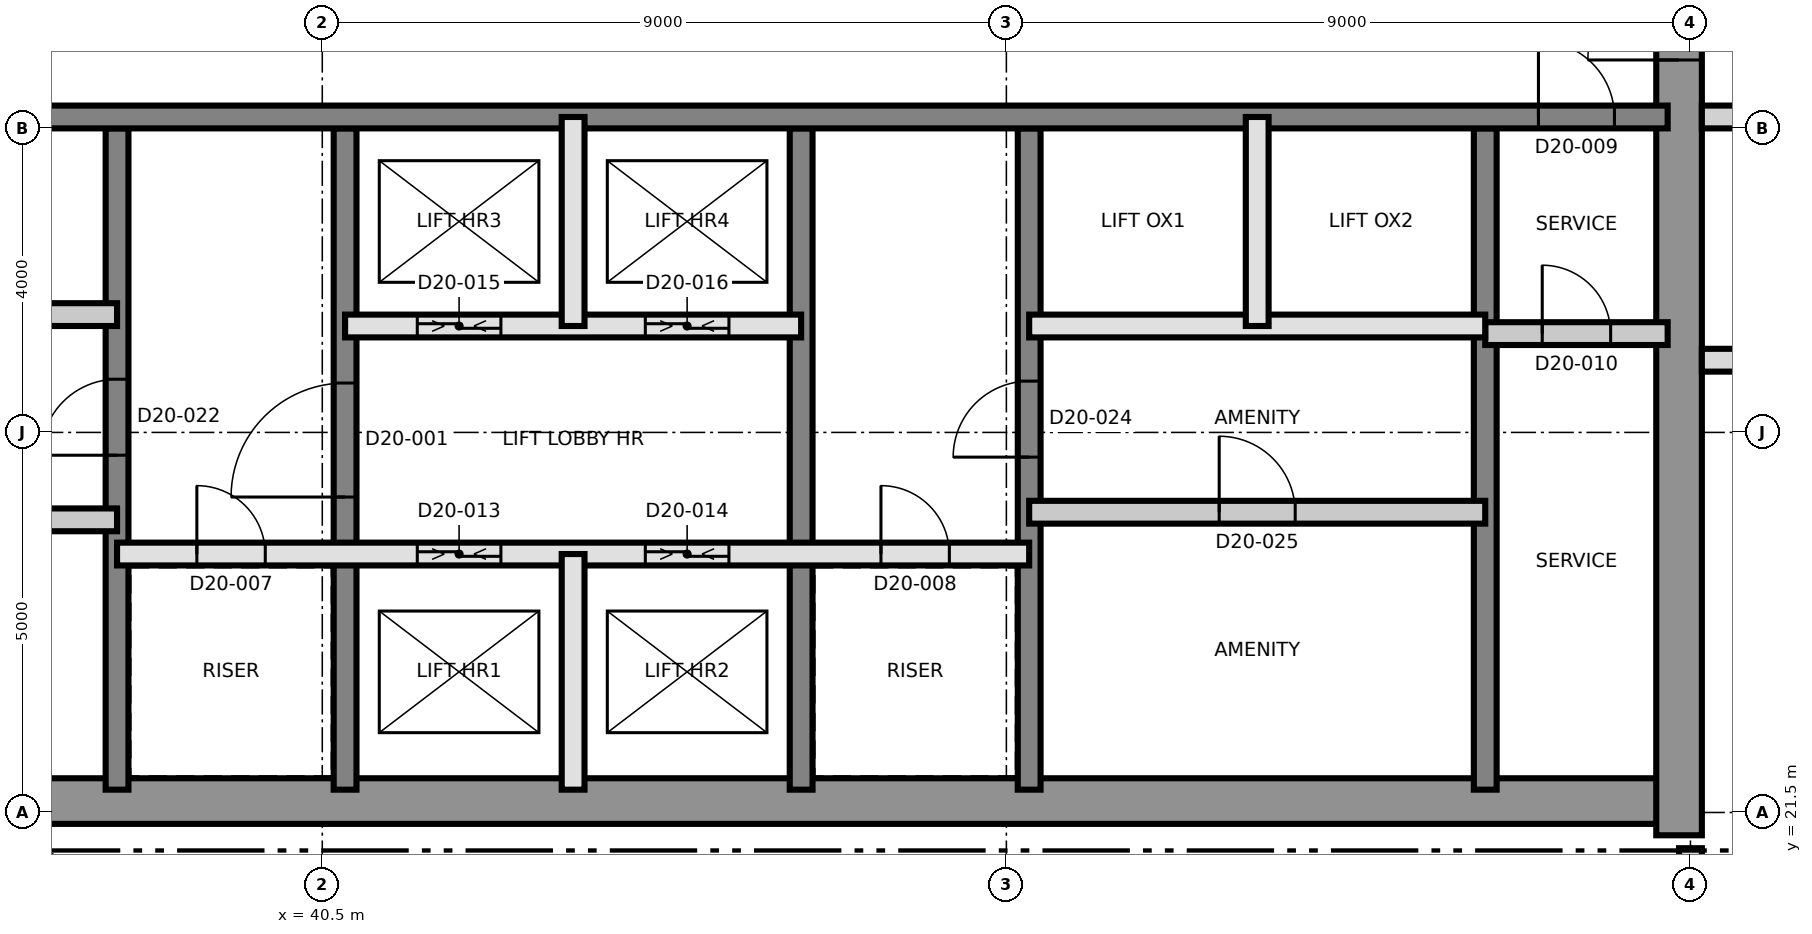
"""IFC4 building model, lengths in metres.
Left out: names, types, materials, properties, quantities, classifications, styles, units other than length and angle.
Written with IfcOpenShell. Run it as: python <this file> out.ifc"""

import sys

from ifc_helpers import new_model, si_unit, direction, frame, frame_2d, origin, place, context, subcontext, project, spatial, rectangle, extrude, element, fill, save


model = new_model("IFC4")
c1 = context("Model", 3, precision=1e-05, world=origin(), true_north=direction((0.0, 1.0)))
c2 = subcontext(c1, "Body", "Model", "MODEL_VIEW")
j1 = project(units=[si_unit("LENGTHUNIT", "METRE"), si_unit("PLANEANGLEUNIT", "RADIAN")], contexts=[c1])
p1 = place(None, origin())
s1 = spatial("IfcSite", under=j1, at=p1, CompositionType="ELEMENT")
p2 = place(p1, origin())
s2 = spatial("IfcBuilding", under=s1, at=p2, CompositionType="ELEMENT")
p3 = place(p2, frame((0.0, 0.0, 186.6)))
s3 = spatial("IfcBuildingStorey", under=s2, at=p3, CompositionType="ELEMENT", Elevation=186.6)
p4 = place(p3, frame((31.2, 21.65, 0.0), z_axis=(0.0, 0.0, 1.0), x_axis=(1.0, 0.0, 0.0)))
e1 = element("IfcWall", 1, at=p4, inside=s3, PredefinedType="SHEAR", context=c2, shape_type="SweptSolid", body=[
    extrude(rectangle(XDim=27.0, YDim=0.6, at=frame_2d((13.5, 0.0))), origin(), (0.0, 0.0, 1.0), 3.7),
])
p5 = place(p3, frame((58.35, 21.2, 0.0), z_axis=(0.0, 0.0, 1.0), x_axis=(0.0, 1.0, 0.0)))
e2 = element("IfcWall", 2, at=p5, inside=s3, PredefinedType="SHEAR", context=c2, shape_type="SweptSolid", body=[
    extrude(rectangle(XDim=18.6, YDim=0.6, at=frame_2d((9.3, 0.0))), origin(), (0.0, 0.0, 1.0), 3.7),
])
p6 = place(p5, frame((10.2, 0.0, 0.0)))
e3 = element("IfcOpeningElement", 3, at=p6, cuts=e2, PredefinedType="OPENING", context=c2, shape_type="SweptSolid", body=[
    extrude(rectangle(XDim=1.2, YDim=2.1, at=frame_2d((0.6, 1.05))), frame((0.0, 0.31, 0.0), z_axis=(0.0, -1.0, 0.0), x_axis=(1.0, 0.0, 0.0)), (0.0, 0.0, 1.0), 0.62),
])
p7 = place(p3, frame((37.8, 21.8, 0.0), z_axis=(0.0, 0.0, 1.0), x_axis=(0.0, 1.0, 0.0)))
e4 = element("IfcWall", 4, at=p7, inside=s3, PredefinedType="SHEAR", context=c2, shape_type="SweptSolid", body=[
    extrude(rectangle(XDim=8.7, YDim=0.3, at=frame_2d((4.35, 0.0))), origin(), (0.0, 0.0, 1.0), 3.7),
])
p8 = place(p7, frame((4.4, 0.0, 0.0)))
e5 = element("IfcOpeningElement", 5, at=p8, cuts=e4, PredefinedType="OPENING", context=c2, shape_type="SweptSolid", body=[
    extrude(rectangle(XDim=1.0, YDim=2.1, at=frame_2d((0.5, 1.05))), frame((0.0, 0.16, 0.0), z_axis=(0.0, -1.0, 0.0), x_axis=(1.0, 0.0, 0.0)), (0.0, 0.0, 1.0), 0.32),
])
p9 = place(p3, frame((40.8, 21.8, 0.0), z_axis=(0.0, 0.0, 1.0), x_axis=(0.0, 1.0, 0.0)))
e6 = element("IfcWall", 6, at=p9, inside=s3, PredefinedType="SHEAR", context=c2, shape_type="SweptSolid", body=[
    extrude(rectangle(XDim=8.7, YDim=0.3, at=frame_2d((4.35, 0.0))), origin(), (0.0, 0.0, 1.0), 3.7),
])
p10 = place(p9, frame((3.85, 0.0, 0.0)))
e7 = element("IfcOpeningElement", 7, at=p10, cuts=e6, PredefinedType="OPENING", context=c2, shape_type="SweptSolid", body=[
    extrude(rectangle(XDim=1.5, YDim=2.1, at=frame_2d((0.75, 1.05))), frame((0.0, 0.16, 0.0), z_axis=(0.0, -1.0, 0.0), x_axis=(1.0, 0.0, 0.0)), (0.0, 0.0, 1.0), 0.32),
])
p11 = place(p3, frame((46.8, 21.8, 0.0), z_axis=(0.0, 0.0, 1.0), x_axis=(0.0, 1.0, 0.0)))
e8 = element("IfcWall", 8, at=p11, inside=s3, PredefinedType="SHEAR", context=c2, shape_type="SweptSolid", body=[
    extrude(rectangle(XDim=8.7, YDim=0.3, at=frame_2d((4.35, 0.0))), origin(), (0.0, 0.0, 1.0), 3.7),
])
p12 = place(p3, frame((49.8, 21.8, 0.0), z_axis=(0.0, 0.0, 1.0), x_axis=(0.0, 1.0, 0.0)))
e9 = element("IfcWall", 9, at=p12, inside=s3, PredefinedType="SHEAR", context=c2, shape_type="SweptSolid", body=[
    extrude(rectangle(XDim=8.7, YDim=0.3, at=frame_2d((4.35, 0.0))), origin(), (0.0, 0.0, 1.0), 3.7),
])
p13 = place(p12, frame((4.375, 0.0, 0.0)))
e10 = element("IfcOpeningElement", 10, at=p13, cuts=e9, PredefinedType="OPENING", context=c2, shape_type="SweptSolid", body=[
    extrude(rectangle(XDim=1.0, YDim=2.1, at=frame_2d((0.5, 1.05))), frame((0.0, 0.16, 0.0), z_axis=(0.0, -1.0, 0.0), x_axis=(1.0, 0.0, 0.0)), (0.0, 0.0, 1.0), 0.32),
])
p14 = place(p3, frame((55.8, 21.8, 0.0), z_axis=(0.0, 0.0, 1.0), x_axis=(0.0, 1.0, 0.0)))
e11 = element("IfcWall", 11, at=p14, inside=s3, PredefinedType="SHEAR", context=c2, shape_type="SweptSolid", body=[
    extrude(rectangle(XDim=8.7, YDim=0.3, at=frame_2d((4.35, 0.0))), origin(), (0.0, 0.0, 1.0), 3.7),
])
p15 = place(p3, frame((31.8, 30.65, 0.0), z_axis=(0.0, 0.0, 1.0), x_axis=(1.0, 0.0, 0.0)))
e12 = element("IfcWall", 12, at=p15, inside=s3, PredefinedType="SHEAR", context=c2, shape_type="SweptSolid", body=[
    extrude(rectangle(XDim=26.4, YDim=0.3, at=frame_2d((13.2, 0.0))), origin(), (0.0, 0.0, 1.0), 3.7),
])
p16 = place(p15, frame((24.7, 0.0, 0.0)))
e13 = element("IfcOpeningElement", 13, at=p16, cuts=e12, PredefinedType="OPENING", context=c2, shape_type="SweptSolid", body=[
    extrude(rectangle(XDim=1.0, YDim=2.1, at=frame_2d((0.5, 1.05))), frame((0.0, 0.16, 0.0), z_axis=(0.0, -1.0, 0.0), x_axis=(1.0, 0.0, 0.0)), (0.0, 0.0, 1.0), 0.32),
])
p17 = place(p15, frame((4.0, 0.0, 0.0)))
e14 = element("IfcOpeningElement", 14, at=p17, cuts=e12, PredefinedType="OPENING", context=c2, shape_type="SweptSolid", body=[
    extrude(rectangle(XDim=1.0, YDim=2.1, at=frame_2d((0.5, 1.05))), frame((0.0, 0.16, 0.0), z_axis=(0.0, -1.0, 0.0), x_axis=(1.0, 0.0, 0.0)), (0.0, 0.0, 1.0), 0.32),
])
p18 = place(p3, frame((36.788, 20.834, 0.0), z_axis=(0.0, 0.0, 1.0), x_axis=(0.896857753975, -0.442319080682, 0.0)))
e15 = element("IfcWall", 15, at=p18, inside=s3, PredefinedType="SOLIDWALL", context=c2, shape_type="SweptSolid", body=[
    extrude(rectangle(XDim=1.618, YDim=0.3, at=frame_2d((0.809, 0.0))), origin(), (0.0, 0.0, 1.0), 3.4),
])
p19 = place(p3, frame((37.8, 24.9, 0.0), z_axis=(0.0, 0.0, 1.0), x_axis=(1.0, 0.0, 0.0)))
e16 = element("IfcWall", 16, at=p19, inside=s3, PredefinedType="SOLIDWALL", context=c2, shape_type="SweptSolid", body=[
    extrude(rectangle(XDim=12.0, YDim=0.3, at=frame_2d((6.0, 0.0))), origin(), (0.0, 0.0, 1.0), 3.4),
])
p20 = place(p19, frame((1.05, 0.0, 0.0)))
e17 = element("IfcOpeningElement", 17, at=p20, cuts=e16, PredefinedType="OPENING", context=c2, shape_type="SweptSolid", body=[
    extrude(rectangle(XDim=0.9, YDim=2.1, at=frame_2d((0.45, 1.05))), frame((0.0, 0.16, 0.0), z_axis=(0.0, -1.0, 0.0), x_axis=(1.0, 0.0, 0.0)), (0.0, 0.0, 1.0), 0.32),
])
p21 = place(p19, frame((10.05, 0.0, 0.0)))
e18 = element("IfcOpeningElement", 18, at=p21, cuts=e16, PredefinedType="OPENING", context=c2, shape_type="SweptSolid", body=[
    extrude(rectangle(XDim=0.9, YDim=2.1, at=frame_2d((0.45, 1.05))), frame((0.0, 0.16, 0.0), z_axis=(0.0, -1.0, 0.0), x_axis=(1.0, 0.0, 0.0)), (0.0, 0.0, 1.0), 0.32),
])
p22 = place(p19, frame((3.95, 0.0, 0.0)))
e19 = element("IfcOpeningElement", 19, at=p22, cuts=e16, PredefinedType="OPENING", context=c2, shape_type="SweptSolid", body=[
    extrude(rectangle(XDim=1.1, YDim=2.4, at=frame_2d((0.55, 1.2))), frame((0.0, 0.16, 0.0), z_axis=(0.0, -1.0, 0.0), x_axis=(1.0, 0.0, 0.0)), (0.0, 0.0, 1.0), 0.32),
])
p23 = place(p19, frame((6.95, 0.0, 0.0)))
e20 = element("IfcOpeningElement", 20, at=p23, cuts=e16, PredefinedType="OPENING", context=c2, shape_type="SweptSolid", body=[
    extrude(rectangle(XDim=1.1, YDim=2.4, at=frame_2d((0.55, 1.2))), frame((0.0, 0.16, 0.0), z_axis=(0.0, -1.0, 0.0), x_axis=(1.0, 0.0, 0.0)), (0.0, 0.0, 1.0), 0.32),
])
p24 = place(p3, frame((31.8, 25.35, 0.0), z_axis=(0.0, 0.0, 1.0), x_axis=(1.0, 0.0, 0.0)))
e21 = element("IfcWall", 21, at=p24, inside=s3, PredefinedType="PARTITIONING", context=c2, shape_type="SweptSolid", body=[
    extrude(rectangle(XDim=6.0, YDim=0.3, at=frame_2d((3.0, 0.0))), origin(), (0.0, 0.0, 1.0), 3.4),
])
p25 = place(p24, frame((2.5, 0.0, 0.0)))
e22 = element("IfcOpeningElement", 22, at=p25, cuts=e21, PredefinedType="OPENING", context=c2, shape_type="SweptSolid", body=[
    extrude(rectangle(XDim=1.0, YDim=2.1, at=frame_2d((0.5, 1.05))), frame((0.0, 0.16, 0.0), z_axis=(0.0, -1.0, 0.0), x_axis=(1.0, 0.0, 0.0)), (0.0, 0.0, 1.0), 0.32),
])
p26 = place(p3, frame((49.8, 25.45, 0.0), z_axis=(0.0, 0.0, 1.0), x_axis=(1.0, 0.0, 0.0)))
e23 = element("IfcWall", 23, at=p26, inside=s3, PredefinedType="PARTITIONING", context=c2, shape_type="SweptSolid", body=[
    extrude(rectangle(XDim=6.0, YDim=0.3, at=frame_2d((3.0, 0.0))), origin(), (0.0, 0.0, 1.0), 3.4),
])
p27 = place(p26, frame((2.5, 0.0, 0.0)))
e24 = element("IfcOpeningElement", 24, at=p27, cuts=e23, PredefinedType="OPENING", context=c2, shape_type="SweptSolid", body=[
    extrude(rectangle(XDim=1.0, YDim=2.1, at=frame_2d((0.5, 1.05))), frame((0.0, 0.16, 0.0), z_axis=(0.0, -1.0, 0.0), x_axis=(1.0, 0.0, 0.0)), (0.0, 0.0, 1.0), 0.32),
])
p28 = place(p3, frame((55.8, 27.8, 0.0), z_axis=(0.0, 0.0, 1.0), x_axis=(1.0, 0.0, 0.0)))
e25 = element("IfcWall", 25, at=p28, inside=s3, PredefinedType="PARTITIONING", context=c2, shape_type="SweptSolid", body=[
    extrude(rectangle(XDim=2.4, YDim=0.3, at=frame_2d((1.2, 0.0))), origin(), (0.0, 0.0, 1.0), 3.4),
])
p29 = place(p28, frame((0.75, 0.0, 0.0)))
e26 = element("IfcOpeningElement", 26, at=p29, cuts=e25, PredefinedType="OPENING", context=c2, shape_type="SweptSolid", body=[
    extrude(rectangle(XDim=0.9, YDim=2.1, at=frame_2d((0.45, 1.05))), frame((0.0, 0.16, 0.0), z_axis=(0.0, -1.0, 0.0), x_axis=(1.0, 0.0, 0.0)), (0.0, 0.0, 1.0), 0.32),
])
p30 = place(p3, frame((40.8, 27.9, 0.0), z_axis=(0.0, 0.0, 1.0), x_axis=(1.0, 0.0, 0.0)))
e27 = element("IfcWall", 27, at=p30, inside=s3, PredefinedType="SOLIDWALL", context=c2, shape_type="SweptSolid", body=[
    extrude(rectangle(XDim=6.0, YDim=0.3, at=frame_2d((3.0, 0.0))), origin(), (0.0, 0.0, 1.0), 3.4),
])
p31 = place(p30, frame((0.95, 0.0, 0.0)))
e28 = element("IfcOpeningElement", 28, at=p31, cuts=e27, PredefinedType="OPENING", context=c2, shape_type="SweptSolid", body=[
    extrude(rectangle(XDim=1.1, YDim=2.4, at=frame_2d((0.55, 1.2))), frame((0.0, 0.16, 0.0), z_axis=(0.0, -1.0, 0.0), x_axis=(1.0, 0.0, 0.0)), (0.0, 0.0, 1.0), 0.32),
])
p32 = place(p30, frame((3.95, 0.0, 0.0)))
e29 = element("IfcOpeningElement", 29, at=p32, cuts=e27, PredefinedType="OPENING", context=c2, shape_type="SweptSolid", body=[
    extrude(rectangle(XDim=1.1, YDim=2.4, at=frame_2d((0.55, 1.2))), frame((0.0, 0.16, 0.0), z_axis=(0.0, -1.0, 0.0), x_axis=(1.0, 0.0, 0.0)), (0.0, 0.0, 1.0), 0.32),
])
p33 = place(p3, frame((49.8, 27.9, 0.0), z_axis=(0.0, 0.0, 1.0), x_axis=(1.0, 0.0, 0.0)))
e30 = element("IfcWall", 30, at=p33, inside=s3, PredefinedType="SOLIDWALL", context=c2, shape_type="SweptSolid", body=[
    extrude(rectangle(XDim=6.0, YDim=0.3, at=frame_2d((3.0, 0.0))), origin(), (0.0, 0.0, 1.0), 3.4),
])
p34 = place(p3, frame((31.8, 28.05, 0.0), z_axis=(0.0, 0.0, 1.0), x_axis=(1.0, 0.0, 0.0)))
e31 = element("IfcWall", 31, at=p34, inside=s3, PredefinedType="PARTITIONING", context=c2, shape_type="SweptSolid", body=[
    extrude(rectangle(XDim=6.0, YDim=0.3, at=frame_2d((3.0, 0.0))), origin(), (0.0, 0.0, 1.0), 3.4),
])
p35 = place(p3, frame((43.8, 21.8, 0.0), z_axis=(0.0, 0.0, 1.0), x_axis=(0.0, 1.0, 0.0)))
e32 = element("IfcWall", 32, at=p35, inside=s3, PredefinedType="SOLIDWALL", context=c2, shape_type="SweptSolid", body=[
    extrude(rectangle(XDim=3.1, YDim=0.3, at=frame_2d((1.55, 0.0))), origin(), (0.0, 0.0, 1.0), 3.4),
])
for number, where, z_axis, x_axis in (
    (33, (43.8, 27.9, 0.0), (0.0, 0.0, 1.0), (0.0, 1.0, 0.0)),
    (34, (52.8, 27.9, 0.0), (0.0, 0.0, 1.0), (0.0, 1.0, 0.0)),
):
    element("IfcWall", number, at=place(p3, frame(where, z_axis=z_axis, x_axis=x_axis)), inside=s3, PredefinedType="SOLIDWALL", context=c2, shape_type="SweptSolid", body=[
        extrude(rectangle(XDim=2.75, YDim=0.3, at=frame_2d((1.375, 0.0))), origin(), (0.0, 0.0, 1.0), 3.4),
    ])
p36 = place(p3, frame((58.65, 27.45, 0.0), z_axis=(0.0, 0.0, 1.0), x_axis=(1.0, 0.0, 0.0)))
e35 = element("IfcWall", 35, at=p36, inside=s3, PredefinedType="PARTITIONING", context=c2, shape_type="SweptSolid", body=[
    extrude(rectangle(XDim=2.55, YDim=0.3, at=frame_2d((1.275, 0.0))), origin(), (0.0, 0.0, 1.0), 3.4),
])
p37 = place(p36, frame((0.8, 0.0, 0.0)))
e36 = element("IfcOpeningElement", 36, at=p37, cuts=e35, PredefinedType="OPENING", context=c2, shape_type="SweptSolid", body=[
    extrude(rectangle(XDim=0.8, YDim=2.1, at=frame_2d((0.4, 1.05))), frame((0.0, 0.16, 0.0), z_axis=(0.0, -1.0, 0.0), x_axis=(1.0, 0.0, 0.0)), (0.0, 0.0, 1.0), 0.32),
])
p38 = place(p3, frame((58.65, 30.65, 0.0), z_axis=(0.0, 0.0, 1.0), x_axis=(1.0, 0.0, 0.0)))
e37 = element("IfcWall", 37, at=p38, inside=s3, PredefinedType="PARTITIONING", context=c2, shape_type="SweptSolid", body=[
    extrude(rectangle(XDim=26.68, YDim=0.3, at=frame_2d((13.34, 0.0))), origin(), (0.0, 0.0, 1.0), 3.4),
])
p39 = place(p38, frame((2.9, 0.0, 0.0)))
e38 = element("IfcOpeningElement", 38, at=p39, cuts=e37, PredefinedType="OPENING", context=c2, shape_type="SweptSolid", body=[
    extrude(rectangle(XDim=1.0, YDim=2.1, at=frame_2d((0.5, 1.05))), frame((0.0, 0.16, 0.0), z_axis=(0.0, -1.0, 0.0), x_axis=(1.0, 0.0, 0.0)), (0.0, 0.0, 1.0), 0.32),
])
p40 = place(p38, frame((5.85, 0.0, 0.0)))
e39 = element("IfcOpeningElement", 39, at=p40, cuts=e37, PredefinedType="OPENING", context=c2, shape_type="SweptSolid", body=[
    extrude(rectangle(XDim=1.4, YDim=2.1, at=frame_2d((0.7, 1.05))), frame((0.0, 0.16, 0.0), z_axis=(0.0, -1.0, 0.0), x_axis=(1.0, 0.0, 0.0)), (0.0, 0.0, 1.0), 0.32),
])
p41 = place(p38, frame((10.0, 0.0, 0.0)))
e40 = element("IfcOpeningElement", 40, at=p41, cuts=e37, PredefinedType="OPENING", context=c2, shape_type="SweptSolid", body=[
    extrude(rectangle(XDim=1.0, YDim=2.1, at=frame_2d((0.5, 1.05))), frame((0.0, 0.16, 0.0), z_axis=(0.0, -1.0, 0.0), x_axis=(1.0, 0.0, 0.0)), (0.0, 0.0, 1.0), 0.32),
])
p42 = place(p38, frame((15.85, 0.0, 0.0)))
e41 = element("IfcOpeningElement", 41, at=p42, cuts=e37, PredefinedType="OPENING", context=c2, shape_type="SweptSolid", body=[
    extrude(rectangle(XDim=1.0, YDim=2.1, at=frame_2d((0.5, 1.05))), frame((0.0, 0.16, 0.0), z_axis=(0.0, -1.0, 0.0), x_axis=(1.0, 0.0, 0.0)), (0.0, 0.0, 1.0), 0.32),
])
p43 = place(p38, frame((20.2, 0.0, 0.0)))
e42 = element("IfcOpeningElement", 42, at=p43, cuts=e37, PredefinedType="OPENING", context=c2, shape_type="SweptSolid", body=[
    extrude(rectangle(XDim=1.0, YDim=2.1, at=frame_2d((0.5, 1.05))), frame((0.0, 0.16, 0.0), z_axis=(0.0, -1.0, 0.0), x_axis=(1.0, 0.0, 0.0)), (0.0, 0.0, 1.0), 0.32),
])
p44 = place(p3, frame((58.5, 19.17, 0.0), z_axis=(0.0, 0.0, 1.0), x_axis=(0.0, 1.0, 0.0)))
e43 = element("IfcWall", 43, at=p44, inside=s3, PredefinedType="PARTITIONING", context=c2, shape_type="SweptSolid", body=[
    extrude(rectangle(XDim=1.86, YDim=0.3, at=frame_2d((0.93, 0.0))), origin(), (0.0, 0.0, 1.0), 3.35),
])
p45 = place(p10, origin())
e44 = element("IfcDoor", 44, at=p45, inside=s3, OperationType="SINGLE_SWING_RIGHT", PredefinedType="DOOR", context=c2, shape_type="SweptSolid", body=[
    extrude(rectangle(XDim=1.5, YDim=2.1, at=frame_2d((0.75, 1.05))), frame((0.0, 0.025, 0.0), z_axis=(0.0, -1.0, 0.0), x_axis=(1.0, 0.0, 0.0)), (0.0, 0.0, 1.0), 0.05),
])
fill(e7, e44)
p46 = place(p20, origin())
e45 = element("IfcDoor", 45, at=p46, inside=s3, OperationType="SINGLE_SWING_LEFT", PredefinedType="DOOR", context=c2, shape_type="SweptSolid", body=[
    extrude(rectangle(XDim=0.9, YDim=2.1, at=frame_2d((0.45, 1.05))), frame((0.0, 0.025, 0.0), z_axis=(0.0, -1.0, 0.0), x_axis=(1.0, 0.0, 0.0)), (0.0, 0.0, 1.0), 0.05),
])
fill(e17, e45)
p47 = place(p21, origin())
e46 = element("IfcDoor", 46, at=p47, inside=s3, OperationType="SINGLE_SWING_RIGHT", PredefinedType="DOOR", context=c2, shape_type="SweptSolid", body=[
    extrude(rectangle(XDim=0.9, YDim=2.1, at=frame_2d((0.45, 1.05))), frame((0.0, 0.025, 0.0), z_axis=(0.0, -1.0, 0.0), x_axis=(1.0, 0.0, 0.0)), (0.0, 0.0, 1.0), 0.05),
])
fill(e18, e46)
p48 = place(p16, origin())
e47 = element("IfcDoor", 47, at=p48, inside=s3, OperationType="SINGLE_SWING_LEFT", PredefinedType="DOOR", context=c2, shape_type="SweptSolid", body=[
    extrude(rectangle(XDim=1.0, YDim=2.1, at=frame_2d((0.5, 1.05))), frame((0.0, 0.025, 0.0), z_axis=(0.0, -1.0, 0.0), x_axis=(1.0, 0.0, 0.0)), (0.0, 0.0, 1.0), 0.05),
])
fill(e13, e47)
p49 = place(p29, origin())
e48 = element("IfcDoor", 48, at=p49, inside=s3, OperationType="SINGLE_SWING_RIGHT", PredefinedType="DOOR", context=c2, shape_type="SweptSolid", body=[
    extrude(rectangle(XDim=0.9, YDim=2.1, at=frame_2d((0.45, 1.05))), frame((0.0, 0.025, 0.0), z_axis=(0.0, -1.0, 0.0), x_axis=(1.0, 0.0, 0.0)), (0.0, 0.0, 1.0), 0.05),
])
fill(e26, e48)
p50 = place(p6, origin())
e49 = element("IfcDoor", 49, at=p50, inside=s3, OperationType="SINGLE_SWING_LEFT", PredefinedType="DOOR", context=c2, shape_type="SweptSolid", body=[
    extrude(rectangle(XDim=1.2, YDim=2.1, at=frame_2d((0.6, 1.05))), frame((0.0, 0.025, 0.0), z_axis=(0.0, -1.0, 0.0), x_axis=(1.0, 0.0, 0.0)), (0.0, 0.0, 1.0), 0.05),
])
fill(e3, e49)
p51 = place(p22, origin())
e50 = element("IfcDoor", 50, at=p51, inside=s3, OperationType="SLIDING_TO_LEFT", PredefinedType="DOOR", context=c2, shape_type="SweptSolid", body=[
    extrude(rectangle(XDim=1.1, YDim=2.4, at=frame_2d((0.55, 1.2))), frame((0.0, 0.025, 0.0), z_axis=(0.0, -1.0, 0.0), x_axis=(1.0, 0.0, 0.0)), (0.0, 0.0, 1.0), 0.05),
])
fill(e19, e50)
p52 = place(p23, origin())
e51 = element("IfcDoor", 51, at=p52, inside=s3, OperationType="SLIDING_TO_LEFT", PredefinedType="DOOR", context=c2, shape_type="SweptSolid", body=[
    extrude(rectangle(XDim=1.1, YDim=2.4, at=frame_2d((0.55, 1.2))), frame((0.0, 0.025, 0.0), z_axis=(0.0, -1.0, 0.0), x_axis=(1.0, 0.0, 0.0)), (0.0, 0.0, 1.0), 0.05),
])
fill(e20, e51)
p53 = place(p31, origin())
e52 = element("IfcDoor", 52, at=p53, inside=s3, OperationType="SLIDING_TO_LEFT", PredefinedType="DOOR", context=c2, shape_type="SweptSolid", body=[
    extrude(rectangle(XDim=1.1, YDim=2.4, at=frame_2d((0.55, 1.2))), frame((0.0, 0.025, 0.0), z_axis=(0.0, -1.0, 0.0), x_axis=(1.0, 0.0, 0.0)), (0.0, 0.0, 1.0), 0.05),
])
fill(e28, e52)
p54 = place(p32, origin())
e53 = element("IfcDoor", 53, at=p54, inside=s3, OperationType="SLIDING_TO_LEFT", PredefinedType="DOOR", context=c2, shape_type="SweptSolid", body=[
    extrude(rectangle(XDim=1.1, YDim=2.4, at=frame_2d((0.55, 1.2))), frame((0.0, 0.025, 0.0), z_axis=(0.0, -1.0, 0.0), x_axis=(1.0, 0.0, 0.0)), (0.0, 0.0, 1.0), 0.05),
])
fill(e29, e53)
p55 = place(p8, origin())
e54 = element("IfcDoor", 54, at=p55, inside=s3, OperationType="SINGLE_SWING_RIGHT", PredefinedType="DOOR", context=c2, shape_type="SweptSolid", body=[
    extrude(rectangle(XDim=1.0, YDim=2.1, at=frame_2d((0.5, 1.05))), frame((0.0, 0.025, 0.0), z_axis=(0.0, -1.0, 0.0), x_axis=(1.0, 0.0, 0.0)), (0.0, 0.0, 1.0), 0.05),
])
fill(e5, e54)
p56 = place(p13, origin())
e55 = element("IfcDoor", 55, at=p56, inside=s3, OperationType="SINGLE_SWING_RIGHT", PredefinedType="DOOR", context=c2, shape_type="SweptSolid", body=[
    extrude(rectangle(XDim=1.0, YDim=2.1, at=frame_2d((0.5, 1.05))), frame((0.0, 0.025, 0.0), z_axis=(0.0, -1.0, 0.0), x_axis=(1.0, 0.0, 0.0)), (0.0, 0.0, 1.0), 0.05),
])
fill(e10, e55)
p57 = place(p27, origin())
e56 = element("IfcDoor", 56, at=p57, inside=s3, OperationType="SINGLE_SWING_RIGHT", PredefinedType="DOOR", context=c2, shape_type="SweptSolid", body=[
    extrude(rectangle(XDim=1.0, YDim=2.1, at=frame_2d((0.5, 1.05))), frame((0.0, 0.025, 0.0), z_axis=(0.0, -1.0, 0.0), x_axis=(1.0, 0.0, 0.0)), (0.0, 0.0, 1.0), 0.05),
])
fill(e24, e56)
save(model, sys.argv[1])
